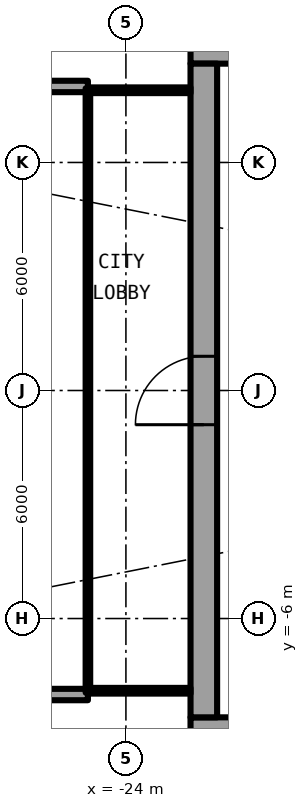
"""IFC4 building model, lengths in metres.
Left out: names, types, materials, properties, quantities, classifications, styles, units other than length and angle.
Written with IfcOpenShell. Run it as: python <this file> out.ifc"""

import sys

from ifc_helpers import new_model, si_unit, direction, frame, frame_2d, origin, place, context, subcontext, project, spatial, rectangle, extrude, element, fill, save


model = new_model("IFC4")
c1 = context("Model", 3, precision=1e-05, world=origin(), true_north=direction((0.0, 1.0)))
c2 = subcontext(c1, "Body", "Model", "MODEL_VIEW")
j1 = project(units=[si_unit("LENGTHUNIT", "METRE"), si_unit("PLANEANGLEUNIT", "RADIAN")], contexts=[c1])
p1 = place(None, origin())
s1 = spatial("IfcSite", under=j1, at=p1, CompositionType="ELEMENT")
p2 = place(p1, origin())
s2 = spatial("IfcBuilding", under=s1, at=p2, CompositionType="ELEMENT")
p3 = place(p2, frame((0.0, 0.0, 72.75)))
s3 = spatial("IfcBuildingStorey", under=s2, at=p3, CompositionType="ELEMENT", Elevation=72.75)
for number, where, z_axis, x_axis in (
    (1, (-25.0, 8.0, 0.0), (0.0, 0.0, 1.0), (-1.0, 0.0, 0.0)),
    (2, (-25.0, -8.0, 0.0), (0.0, 0.0, 1.0), (-1.0, 0.0, 0.0)),
):
    element("IfcWall", number, at=place(p3, frame(where, z_axis=z_axis, x_axis=x_axis)), inside=s3, PredefinedType="SOLIDWALL", context=c2, shape_type="SweptSolid", body=[
        extrude(rectangle(XDim=2.667, YDim=0.3, at=frame_2d((1.333, 0.0))), origin(), (0.0, 0.0, 1.0), 2.7),
    ])
p4 = place(p3, frame((-22.3, -8.95, 0.0), z_axis=(0.0, 0.0, 1.0), x_axis=(1.0, 0.0, 0.0)))
e3 = element("IfcWall", 3, at=p4, inside=s3, PredefinedType="SHEAR", context=c2, shape_type="SweptSolid", body=[
    extrude(rectangle(XDim=14.0, YDim=0.7, at=frame_2d((7.0, 0.0))), origin(), (0.0, 0.0, 1.0), 3.05),
])
p5 = place(p4, frame((1.225, 0.0, 0.0)))
e4 = element("IfcOpeningElement", 4, at=p5, cuts=e3, PredefinedType="OPENING", context=c2, shape_type="SweptSolid", body=[
    extrude(rectangle(XDim=1.2, YDim=2.3, at=frame_2d((0.6, 1.15))), frame((0.0, 0.36, 0.0), z_axis=(0.0, -1.0, 0.0), x_axis=(1.0, 0.0, 0.0)), (0.0, 0.0, 1.0), 0.72),
])
p6 = place(p3, frame((-8.3, 8.95, 0.0), z_axis=(0.0, 0.0, 1.0), x_axis=(-1.0, 0.0, 0.0)))
e5 = element("IfcWall", 5, at=p6, inside=s3, PredefinedType="SHEAR", context=c2, shape_type="SweptSolid", body=[
    extrude(rectangle(XDim=14.0, YDim=0.7, at=frame_2d((7.0, 0.0))), origin(), (0.0, 0.0, 1.0), 3.05),
])
p7 = place(p6, frame((11.575, 0.0, 0.0)))
e6 = element("IfcOpeningElement", 6, at=p7, cuts=e5, PredefinedType="OPENING", context=c2, shape_type="SweptSolid", body=[
    extrude(rectangle(XDim=1.2, YDim=2.3, at=frame_2d((0.6, 1.15))), frame((0.0, 0.36, 0.0), z_axis=(0.0, -1.0, 0.0), x_axis=(1.0, 0.0, 0.0)), (0.0, 0.0, 1.0), 0.72),
])
p8 = place(p3, frame((-21.95, -8.6, 0.0), z_axis=(0.0, 0.0, 1.0), x_axis=(0.0, 1.0, 0.0)))
e7 = element("IfcWall", 7, at=p8, inside=s3, PredefinedType="SHEAR", context=c2, shape_type="SweptSolid", body=[
    extrude(rectangle(XDim=17.2, YDim=0.7, at=frame_2d((8.6, 0.0))), origin(), (0.0, 0.0, 1.0), 3.05),
])
p9 = place(p8, frame((7.7, 0.0, 0.0)))
e8 = element("IfcOpeningElement", 8, at=p9, cuts=e7, PredefinedType="OPENING", context=c2, shape_type="SweptSolid", body=[
    extrude(rectangle(XDim=1.8, YDim=2.3, at=frame_2d((0.9, 1.15))), frame((0.0, 0.36, 0.0), z_axis=(0.0, -1.0, 0.0), x_axis=(1.0, 0.0, 0.0)), (0.0, 0.0, 1.0), 0.72),
])
for number, where, z_axis, x_axis in (
    (9, (-22.3, 7.9, 0.0), (0.0, 0.0, 1.0), (-1.0, 0.0, 0.0)),
    (10, (-22.3, -7.9, 0.0), (0.0, 0.0, 1.0), (-1.0, 0.0, 0.0)),
):
    element("IfcWall", number, at=place(p3, frame(where, z_axis=z_axis, x_axis=x_axis)), inside=s3, PredefinedType="PARTITIONING", context=c2, shape_type="SweptSolid", body=[
        extrude(rectangle(XDim=2.64, YDim=0.15, at=frame_2d((1.32, 0.0))), origin(), (0.0, 0.0, 1.0), 2.7),
    ])
p10 = place(p3, frame((-25.0, 7.95, 0.0), z_axis=(0.0, 0.0, 1.0), x_axis=(0.0, -1.0, 0.0)))
e11 = element("IfcWall", 11, at=p10, inside=s3, PredefinedType="PARTITIONING", context=c2, shape_type="SweptSolid", body=[
    extrude(rectangle(XDim=15.9, YDim=0.12, at=frame_2d((7.95, 0.0))), origin(), (0.0, 0.0, 1.0), 2.7),
])
p11 = place(p10, frame((0.95, 0.0, 0.1)))
e12 = element("IfcOpeningElement", 12, at=p11, cuts=e11, PredefinedType="OPENING", context=c2, shape_type="SweptSolid", body=[
    extrude(rectangle(XDim=14.0, YDim=2.35, at=frame_2d((7.0, 1.175))), frame((0.0, 0.07, 0.0), z_axis=(0.0, -1.0, 0.0), x_axis=(1.0, 0.0, 0.0)), (0.0, 0.0, 1.0), 0.14),
])
p12 = place(p9, origin())
e13 = element("IfcDoor", 13, at=p12, inside=s3, OperationType="SINGLE_SWING_LEFT", PredefinedType="DOOR", context=c2, shape_type="SweptSolid", body=[
    extrude(rectangle(XDim=1.8, YDim=2.3, at=frame_2d((0.9, 1.15))), frame((0.0, 0.025, 0.0), z_axis=(0.0, -1.0, 0.0), x_axis=(1.0, 0.0, 0.0)), (0.0, 0.0, 1.0), 0.05),
])
fill(e8, e13)
p13 = place(p11, origin())
e14 = element("IfcWindow", 14, at=p13, inside=s3, PartitioningType="SINGLE_PANEL", PredefinedType="WINDOW", context=c2, shape_type="SweptSolid", body=[
    extrude(rectangle(XDim=14.0, YDim=2.35, at=frame_2d((7.0, 1.175))), frame((0.0, 0.03, 0.0), z_axis=(0.0, -1.0, 0.0), x_axis=(1.0, 0.0, 0.0)), (0.0, 0.0, 1.0), 0.06),
])
fill(e12, e14)
save(model, sys.argv[1])
